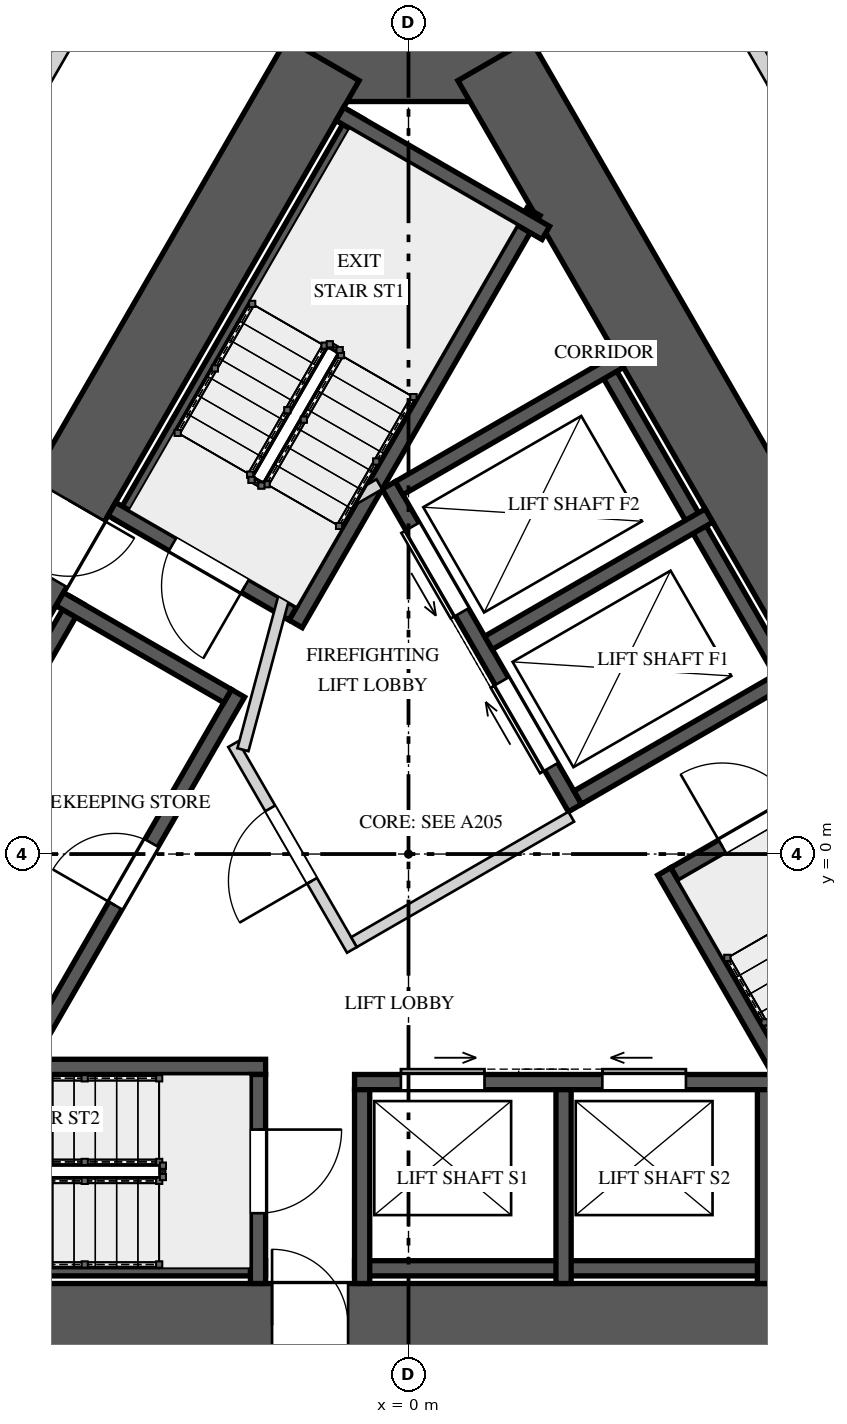
"""IFC4 building model, lengths in metres.
Left out: names, types, materials, properties, quantities, classifications, styles, units other than length and angle.
Written with IfcOpenShell. Run it as: python <this file> out.ifc"""

import sys

from ifc_helpers import new_model, si_unit, direction, frame, frame_2d, origin, place, context, subcontext, project, spatial, rectangle, extrude, element, fill, save


model = new_model("IFC4")
c1 = context("Model", 3, precision=1e-05, world=origin(), true_north=direction((0.0, 1.0)))
c2 = subcontext(c1, "Body", "Model", "MODEL_VIEW")
j1 = project(units=[si_unit("LENGTHUNIT", "METRE"), si_unit("PLANEANGLEUNIT", "RADIAN")], contexts=[c1])
p1 = place(None, origin())
s1 = spatial("IfcSite", under=j1, at=p1, CompositionType="ELEMENT")
p2 = place(p1, origin())
s2 = spatial("IfcBuilding", under=s1, at=p2, CompositionType="ELEMENT")
p3 = place(p2, frame((0.0, 0.0, 20.0)))
s3 = spatial("IfcBuildingStorey", under=s2, at=p3, CompositionType="ELEMENT", Elevation=20.0)
p4 = place(p3, frame((1.443, 10.45, 0.0), z_axis=(0.0, 0.0, 1.0), x_axis=(-1.0, 0.0, 0.0)))
e1 = element("IfcWall", 1, at=p4, inside=s3, PredefinedType="SHEAR", context=c2, shape_type="SweptSolid", body=[
    extrude(rectangle(XDim=2.887, YDim=1.1, at=frame_2d((1.443, 0.0))), origin(), (0.0, 0.0, 1.0), 5.0),
])
p5 = place(p3, frame((-1.126, 10.45, 0.0), z_axis=(0.0, 0.0, 1.0), x_axis=(-0.500001757713, -0.866024388966, 0.0)))
e2 = element("IfcWall", 2, at=p5, inside=s3, PredefinedType="SHEAR", context=c2, shape_type="SweptSolid", body=[
    extrude(rectangle(XDim=16.974, YDim=1.1, at=frame_2d((8.487, 0.0))), origin(), (0.0, 0.0, 1.0), 5.0),
])
p6 = place(p5, frame((6.692, 0.0, 0.0)))
e3 = element("IfcOpeningElement", 3, at=p6, cuts=e2, PredefinedType="OPENING", context=c2, shape_type="SweptSolid", body=[
    extrude(rectangle(XDim=1.0, YDim=2.4, at=frame_2d((0.5, 1.2))), frame((0.0, 0.56, 0.0), z_axis=(0.0, -1.0, 0.0), x_axis=(1.0, 0.0, 0.0)), (0.0, 0.0, 1.0), 1.12),
])
p7 = place(p5, frame((14.397, 0.0, 0.0)))
e4 = element("IfcOpeningElement", 4, at=p7, cuts=e2, PredefinedType="OPENING", context=c2, shape_type="SweptSolid", body=[
    extrude(rectangle(XDim=0.8, YDim=2.1, at=frame_2d((0.4, 1.05))), frame((0.0, 0.56, 0.0), z_axis=(0.0, -1.0, 0.0), x_axis=(1.0, 0.0, 0.0)), (0.0, 0.0, 1.0), 1.12),
])
p8 = place(p3, frame((-8.487, -6.2, 0.0), z_axis=(0.0, 0.0, 1.0), x_axis=(1.0, 0.0, 0.0)))
e5 = element("IfcWall", 5, at=p8, inside=s3, PredefinedType="SHEAR", context=c2, shape_type="SweptSolid", body=[
    extrude(rectangle(XDim=16.974, YDim=1.1, at=frame_2d((8.487, 0.0))), origin(), (0.0, 0.0, 1.0), 5.0),
])
p9 = place(p8, frame((6.692, 0.0, 0.0)))
e6 = element("IfcOpeningElement", 6, at=p9, cuts=e5, PredefinedType="OPENING", context=c2, shape_type="SweptSolid", body=[
    extrude(rectangle(XDim=1.0, YDim=2.4, at=frame_2d((0.5, 1.2))), frame((0.0, 0.56, 0.0), z_axis=(0.0, -1.0, 0.0), x_axis=(1.0, 0.0, 0.0)), (0.0, 0.0, 1.0), 1.12),
])
p10 = place(p3, frame((9.613, -4.25, 0.0), z_axis=(0.0, 0.0, 1.0), x_axis=(-0.500001757713, 0.866024388966, 0.0)))
e7 = element("IfcWall", 7, at=p10, inside=s3, PredefinedType="SHEAR", context=c2, shape_type="SweptSolid", body=[
    extrude(rectangle(XDim=16.974, YDim=1.1, at=frame_2d((8.487, 0.0))), origin(), (0.0, 0.0, 1.0), 5.0),
])
p11 = place(p10, frame((6.762, 0.0, 0.0)))
e8 = element("IfcOpeningElement", 8, at=p11, cuts=e7, PredefinedType="OPENING", context=c2, shape_type="SweptSolid", body=[
    extrude(rectangle(XDim=1.0, YDim=2.4, at=frame_2d((0.5, 1.2))), frame((0.0, 0.56, 0.0), z_axis=(0.0, -1.0, 0.0), x_axis=(1.0, 0.0, 0.0)), (0.0, 0.0, 1.0), 1.12),
])
p12 = place(p3, frame((-0.68, 9.722, 0.0), z_axis=(0.0, 0.0, 1.0), x_axis=(-0.49998037582, -0.866036733513, 0.0)))
e9 = element("IfcWall", 9, at=p12, inside=s3, PredefinedType="SOLIDWALL", context=c2, shape_type="SweptSolid", body=[
    extrude(rectangle(XDim=6.2, YDim=0.2, at=frame_2d((3.1, 0.0))), origin(), (0.0, 0.0, 1.0), 4.65),
])
p13 = place(p3, frame((1.646, 8.45, 0.0), z_axis=(0.0, 0.0, 1.0), x_axis=(-0.500006002103, -0.866021938441, 0.0)))
e10 = element("IfcWall", 10, at=p13, inside=s3, PredefinedType="SOLIDWALL", context=c2, shape_type="SweptSolid", body=[
    extrude(rectangle(XDim=6.261, YDim=0.2, at=frame_2d((3.13, 0.0))), origin(), (0.0, 0.0, 1.0), 4.65),
])
p14 = place(p3, frame((1.806, 8.172, 0.0), z_axis=(0.0, 0.0, 1.0), x_axis=(-0.866054327916, 0.499949898588, 0.0)))
e11 = element("IfcWall", 11, at=p14, inside=s3, PredefinedType="SOLIDWALL", context=c2, shape_type="SweptSolid", body=[
    extrude(rectangle(XDim=3.128, YDim=0.2, at=frame_2d((1.564, 0.0))), origin(), (0.0, 0.0, 1.0), 4.65),
])
p15 = place(p3, frame((-1.521, 3.165, 0.0), z_axis=(0.0, 0.0, 1.0), x_axis=(-0.866027397988, 0.499996545922, 0.0)))
e12 = element("IfcWall", 12, at=p15, inside=s3, PredefinedType="SOLIDWALL", context=c2, shape_type="SweptSolid", body=[
    extrude(rectangle(XDim=2.75, YDim=0.2, at=frame_2d((1.375, 0.0))), origin(), (0.0, 0.0, 1.0), 4.65),
])
p16 = place(p15, frame((0.725, 0.0, 0.0)))
e13 = element("IfcOpeningElement", 13, at=p16, cuts=e12, PredefinedType="OPENING", context=c2, shape_type="SweptSolid", body=[
    extrude(rectangle(XDim=1.1, YDim=2.4, at=frame_2d((0.55, 1.2))), frame((0.0, 0.11, 0.0), z_axis=(0.0, -1.0, 0.0), x_axis=(1.0, 0.0, 0.0)), (0.0, 0.0, 1.0), 0.22),
])
p17 = place(p3, frame((-8.08, -5.45, 0.0), z_axis=(0.0, 0.0, 1.0), x_axis=(1.0, 0.0, 0.0)))
e14 = element("IfcWall", 14, at=p17, inside=s3, PredefinedType="SOLIDWALL", context=c2, shape_type="SweptSolid", body=[
    extrude(rectangle(XDim=6.2, YDim=0.2, at=frame_2d((3.1, 0.0))), origin(), (0.0, 0.0, 1.0), 4.65),
])
p18 = place(p3, frame((-8.141, -2.8, 0.0), z_axis=(0.0, 0.0, 1.0), x_axis=(1.0, 0.0, 0.0)))
e15 = element("IfcWall", 15, at=p18, inside=s3, PredefinedType="SOLIDWALL", context=c2, shape_type="SweptSolid", body=[
    extrude(rectangle(XDim=6.261, YDim=0.2, at=frame_2d((3.13, 0.0))), origin(), (0.0, 0.0, 1.0), 4.65),
])
p19 = place(p3, frame((-1.98, -2.9, 0.0), z_axis=(0.0, 0.0, 1.0), x_axis=(0.0, -1.0, 0.0)))
e16 = element("IfcWall", 16, at=p19, inside=s3, PredefinedType="SOLIDWALL", context=c2, shape_type="SweptSolid", body=[
    extrude(rectangle(XDim=2.75, YDim=0.2, at=frame_2d((1.375, 0.0))), origin(), (0.0, 0.0, 1.0), 4.65),
])
p20 = place(p19, frame((0.725, 0.0, 0.0)))
e17 = element("IfcOpeningElement", 17, at=p20, cuts=e16, PredefinedType="OPENING", context=c2, shape_type="SweptSolid", body=[
    extrude(rectangle(XDim=1.1, YDim=2.4, at=frame_2d((0.55, 1.2))), frame((0.0, 0.11, 0.0), z_axis=(0.0, -1.0, 0.0), x_axis=(1.0, 0.0, 0.0)), (0.0, 0.0, 1.0), 0.22),
])
p21 = place(p3, frame((6.495, -5.65, 0.0), z_axis=(0.0, 0.0, 1.0), x_axis=(-0.499976754523, 0.866038824151, 0.0)))
e18 = element("IfcWall", 18, at=p21, inside=s3, PredefinedType="SOLIDWALL", context=c2, shape_type="SweptSolid", body=[
    extrude(rectangle(XDim=6.26, YDim=0.2, at=frame_2d((3.13, 0.0))), origin(), (0.0, 0.0, 1.0), 4.65),
])
p22 = place(p3, frame((3.501, -0.265, 0.0), z_axis=(0.0, 0.0, 1.0), x_axis=(0.866027397988, 0.499996545922, 0.0)))
e19 = element("IfcWall", 19, at=p22, inside=s3, PredefinedType="SOLIDWALL", context=c2, shape_type="SweptSolid", body=[
    extrude(rectangle(XDim=2.75, YDim=0.2, at=frame_2d((1.375, 0.0))), origin(), (0.0, 0.0, 1.0), 4.65),
])
p23 = place(p22, frame((0.725, 0.0, 0.0)))
e20 = element("IfcOpeningElement", 20, at=p23, cuts=e19, PredefinedType="OPENING", context=c2, shape_type="SweptSolid", body=[
    extrude(rectangle(XDim=1.1, YDim=2.4, at=frame_2d((0.55, 1.2))), frame((0.0, 0.11, 0.0), z_axis=(0.0, -1.0, 0.0), x_axis=(1.0, 0.0, 0.0)), (0.0, 0.0, 1.0), 0.22),
])
p24 = place(p3, frame((-4.993, -2.648, 0.0), z_axis=(0.0, 0.0, 1.0), x_axis=(0.499996545922, 0.866027397988, 0.0)))
e21 = element("IfcWall", 21, at=p24, inside=s3, PredefinedType="SOLIDWALL", context=c2, shape_type="SweptSolid", body=[
    extrude(rectangle(XDim=5.5, YDim=0.2, at=frame_2d((2.75, 0.0))), origin(), (0.0, 0.0, 1.0), 4.65),
])
p25 = place(p24, frame((2.275, 0.0, 0.0)))
e22 = element("IfcOpeningElement", 22, at=p25, cuts=e21, PredefinedType="OPENING", context=c2, shape_type="SweptSolid", body=[
    extrude(rectangle(XDim=0.95, YDim=2.4, at=frame_2d((0.475, 1.2))), frame((0.0, 0.11, 0.0), z_axis=(0.0, -1.0, 0.0), x_axis=(1.0, 0.0, 0.0)), (0.0, 0.0, 1.0), 0.22),
])
p26 = place(p3, frame((-4.365, 3.34, 0.0), z_axis=(0.0, 0.0, 1.0), x_axis=(-0.499996545922, -0.866027397988, 0.0)))
e23 = element("IfcWall", 23, at=p26, inside=s3, PredefinedType="SOLIDWALL", context=c2, shape_type="SweptSolid", body=[
    extrude(rectangle(XDim=5.5, YDim=0.2, at=frame_2d((2.75, 0.0))), origin(), (0.0, 0.0, 1.0), 4.65),
])
p27 = place(p3, frame((-2.38, 2.078, 0.0), z_axis=(0.0, 0.0, 1.0), x_axis=(-0.866054858364, 0.499948979701, 0.0)))
e24 = element("IfcWall", 24, at=p27, inside=s3, PredefinedType="SOLIDWALL", context=c2, shape_type="SweptSolid", body=[
    extrude(rectangle(XDim=2.55, YDim=0.2, at=frame_2d((1.275, 0.0))), origin(), (0.0, 0.0, 1.0), 4.65),
])
p28 = place(p3, frame((-0.71, -3.0, 0.0), z_axis=(0.0, 0.0, 1.0), x_axis=(1.0, 0.0, 0.0)))
e25 = element("IfcWall", 25, at=p28, inside=s3, PredefinedType="SOLIDWALL", context=c2, shape_type="SweptSolid", body=[
    extrude(rectangle(XDim=5.5, YDim=0.2, at=frame_2d((2.75, 0.0))), origin(), (0.0, 0.0, 1.0), 4.65),
])
p29 = place(p28, frame((0.61, 0.0, 0.0)))
e26 = element("IfcOpeningElement", 26, at=p29, cuts=e25, PredefinedType="OPENING", context=c2, shape_type="SweptSolid", body=[
    extrude(rectangle(XDim=1.1, YDim=2.1, at=frame_2d((0.55, 1.05))), frame((0.0, 0.11, 0.0), z_axis=(0.0, -1.0, 0.0), x_axis=(1.0, 0.0, 0.0)), (0.0, 0.0, 1.0), 0.22),
])
p30 = place(p28, frame((3.26, 0.0, 0.0)))
e27 = element("IfcOpeningElement", 27, at=p30, cuts=e25, PredefinedType="OPENING", context=c2, shape_type="SweptSolid", body=[
    extrude(rectangle(XDim=1.1, YDim=2.1, at=frame_2d((0.55, 1.05))), frame((0.0, 0.11, 0.0), z_axis=(0.0, -1.0, 0.0), x_axis=(1.0, 0.0, 0.0)), (0.0, 0.0, 1.0), 0.22),
])
p31 = place(p3, frame((-0.71, -5.45, 0.0), z_axis=(0.0, 0.0, 1.0), x_axis=(1.0, 0.0, 0.0)))
e28 = element("IfcWall", 28, at=p31, inside=s3, PredefinedType="SOLIDWALL", context=c2, shape_type="SweptSolid", body=[
    extrude(rectangle(XDim=5.5, YDim=0.2, at=frame_2d((2.75, 0.0))), origin(), (0.0, 0.0, 1.0), 4.65),
])
for number, where, z_axis, x_axis in (
    (29, (-0.61, -3.1, 0.0), (0.0, 0.0, 1.0), (0.0, -1.0, 0.0)),
    (30, (2.04, -3.1, 0.0), (0.0, 0.0, 1.0), (0.0, -1.0, 0.0)),
    (31, (4.69, -3.1, 0.0), (0.0, 0.0, 1.0), (0.0, -1.0, 0.0)),
):
    element("IfcWall", number, at=place(p3, frame(where, z_axis=z_axis, x_axis=x_axis)), inside=s3, PredefinedType="SOLIDWALL", context=c2, shape_type="SweptSolid", body=[
        extrude(rectangle(XDim=2.55, YDim=0.2, at=frame_2d((1.275, 0.0))), origin(), (0.0, 0.0, 1.0), 4.65),
    ])
p32 = place(p3, frame((2.19, 0.606, 0.0), z_axis=(0.0, 0.0, 1.0), x_axis=(-0.500002801628, 0.866023786258, 0.0)))
e32 = element("IfcWall", 32, at=p32, inside=s3, PredefinedType="SOLIDWALL", context=c2, shape_type="SweptSolid", body=[
    extrude(rectangle(XDim=4.9, YDim=0.2, at=frame_2d((2.45, 0.0))), origin(), (0.0, 0.0, 1.0), 4.65),
])
p33 = place(p32, frame((0.625, 0.0, 0.0)))
e33 = element("IfcOpeningElement", 33, at=p33, cuts=e32, PredefinedType="OPENING", context=c2, shape_type="SweptSolid", body=[
    extrude(rectangle(XDim=1.3, YDim=2.1, at=frame_2d((0.65, 1.05))), frame((0.0, 0.11, 0.0), z_axis=(0.0, -1.0, 0.0), x_axis=(1.0, 0.0, 0.0)), (0.0, 0.0, 1.0), 0.22),
])
p34 = place(p32, frame((2.975, 0.0, 0.0)))
e34 = element("IfcOpeningElement", 34, at=p34, cuts=e32, PredefinedType="OPENING", context=c2, shape_type="SweptSolid", body=[
    extrude(rectangle(XDim=1.3, YDim=2.1, at=frame_2d((0.65, 1.05))), frame((0.0, 0.11, 0.0), z_axis=(0.0, -1.0, 0.0), x_axis=(1.0, 0.0, 0.0)), (0.0, 0.0, 1.0), 0.22),
])
p35 = place(p3, frame((5.005, 2.231, 0.0), z_axis=(0.0, 0.0, 1.0), x_axis=(-0.500002801628, 0.866023786258, 0.0)))
e35 = element("IfcWall", 35, at=p35, inside=s3, PredefinedType="SOLIDWALL", context=c2, shape_type="SweptSolid", body=[
    extrude(rectangle(XDim=4.9, YDim=0.2, at=frame_2d((2.45, 0.0))), origin(), (0.0, 0.0, 1.0), 4.65),
])
p36 = place(p3, frame((2.227, 0.743, 0.0), z_axis=(0.0, 0.0, 1.0), x_axis=(0.866014461049, 0.500018952895, 0.0)))
e36 = element("IfcWall", 36, at=p36, inside=s3, PredefinedType="SOLIDWALL", context=c2, shape_type="SweptSolid", body=[
    extrude(rectangle(XDim=3.35, YDim=0.2, at=frame_2d((1.675, 0.0))), origin(), (0.0, 0.0, 1.0), 4.65),
])
p37 = place(p3, frame((1.052, 2.778, 0.0), z_axis=(0.0, 0.0, 1.0), x_axis=(0.866032680314, 0.499987396469, 0.0)))
e37 = element("IfcWall", 37, at=p37, inside=s3, PredefinedType="SOLIDWALL", context=c2, shape_type="SweptSolid", body=[
    extrude(rectangle(XDim=3.35, YDim=0.2, at=frame_2d((1.675, 0.0))), origin(), (0.0, 0.0, 1.0), 4.65),
])
p38 = place(p3, frame((-0.123, 4.813, 0.0), z_axis=(0.0, 0.0, 1.0), x_axis=(0.866014461049, 0.500018952895, 0.0)))
e38 = element("IfcWall", 38, at=p38, inside=s3, PredefinedType="SOLIDWALL", context=c2, shape_type="SweptSolid", body=[
    extrude(rectangle(XDim=3.35, YDim=0.2, at=frame_2d((1.675, 0.0))), origin(), (0.0, 0.0, 1.0), 4.65),
])
p39 = place(p3, frame((-0.744, -1.261, 0.0), z_axis=(0.0, 0.0, 1.0), x_axis=(-0.500004234368, 0.866022959057, 0.0)))
e39 = element("IfcWall", 39, at=p39, inside=s3, PredefinedType="PARTITIONING", context=c2, shape_type="SweptSolid", body=[
    extrude(rectangle(XDim=3.125, YDim=0.15, at=frame_2d((1.562, 0.0))), origin(), (0.0, 0.0, 1.0), 4.65),
])
p40 = place(p39, frame((1.05, 0.0, 0.0)))
e40 = element("IfcOpeningElement", 40, at=p40, cuts=e39, PredefinedType="OPENING", context=c2, shape_type="SweptSolid", body=[
    extrude(rectangle(XDim=1.1, YDim=2.4, at=frame_2d((0.55, 1.2))), frame((0.0, 0.085, 0.0), z_axis=(0.0, -1.0, 0.0), x_axis=(1.0, 0.0, 0.0)), (0.0, 0.0, 1.0), 0.17),
])
p41 = place(p3, frame((-0.717, -1.159, 0.0), z_axis=(0.0, 0.0, 1.0), x_axis=(0.866008176907, 0.50002983664, 0.0)))
e41 = element("IfcWall", 41, at=p41, inside=s3, PredefinedType="PARTITIONING", context=c2, shape_type="SweptSolid", body=[
    extrude(rectangle(XDim=3.3, YDim=0.15, at=frame_2d((1.65, 0.0))), origin(), (0.0, 0.0, 1.0), 4.65),
])
p42 = place(p3, frame((-2.178, 1.372, 0.0), z_axis=(0.0, 0.0, 1.0), x_axis=(0.258808958833, 0.96592852884, 0.0)))
e42 = element("IfcWall", 42, at=p42, inside=s3, PredefinedType="PARTITIONING", context=c2, shape_type="SweptSolid", body=[
    extrude(rectangle(XDim=2.903, YDim=0.15, at=frame_2d((1.451, 0.0))), origin(), (0.0, 0.0, 1.0), 4.65),
])
p43 = place(p3, frame((-1.51, 4.215, 0.0), z_axis=(0.0, 0.0, 1.0), x_axis=(0.866085525409, 0.49989585183, 0.0)))
e43 = element("IfcWall", 43, at=p43, inside=s3, PredefinedType="PARTITIONING", context=c2, shape_type="SweptSolid", body=[
    extrude(rectangle(XDim=1.3, YDim=0.15, at=frame_2d((0.65, 0.0))), origin(), (0.0, 0.0, 1.0), 4.65),
])
p44 = place(p3, frame((3.404, 12.604, 0.0), z_axis=(0.0, 0.0, 1.0), x_axis=(0.500000186108, -0.866025296335, 0.0)))
e44 = element("IfcWall", 44, at=p44, inside=s3, PredefinedType="SOLIDWALL", context=c2, shape_type="SweptSolid", body=[
    extrude(rectangle(XDim=2.815, YDim=0.2, at=frame_2d((1.408, 0.0))), origin(), (0.0, 0.0, 1.0), 4.65),
])
p45 = place(p3, frame((4.812, 10.165, 0.0), z_axis=(0.0, 0.0, 1.0), x_axis=(0.500174821557, -0.865924446982, 0.0)))
e45 = element("IfcWall", 45, at=p45, inside=s3, PredefinedType="SOLIDWALL", context=c2, shape_type="SweptSolid", body=[
    extrude(rectangle(XDim=0.95, YDim=0.2, at=frame_2d((0.475, 0.0))), origin(), (0.0, 0.0, 1.0), 3.75),
])
p46 = place(p3, frame((-4.812, 10.165, 0.0), z_axis=(0.0, 0.0, 1.0), x_axis=(0.500000186108, 0.866025296335, 0.0)))
e46 = element("IfcWall", 46, at=p46, inside=s3, PredefinedType="SOLIDWALL", context=c2, shape_type="SweptSolid", body=[
    extrude(rectangle(XDim=2.815, YDim=0.2, at=frame_2d((1.408, 0.0))), origin(), (0.0, 0.0, 1.0), 4.65),
])
p47 = place(p16, origin())
e47 = element("IfcDoor", 47, at=p47, inside=s3, OperationType="SINGLE_SWING_RIGHT", PredefinedType="DOOR", context=c2, shape_type="SweptSolid", body=[
    extrude(rectangle(XDim=1.1, YDim=2.4, at=frame_2d((0.55, 1.2))), frame((0.0, 0.025, 0.0), z_axis=(0.0, -1.0, 0.0), x_axis=(1.0, 0.0, 0.0)), (0.0, 0.0, 1.0), 0.05),
])
fill(e13, e47)
p48 = place(p20, origin())
e48 = element("IfcDoor", 48, at=p48, inside=s3, OperationType="SINGLE_SWING_LEFT", PredefinedType="DOOR", context=c2, shape_type="SweptSolid", body=[
    extrude(rectangle(XDim=1.1, YDim=2.4, at=frame_2d((0.55, 1.2))), frame((0.0, 0.025, 0.0), z_axis=(0.0, -1.0, 0.0), x_axis=(1.0, 0.0, 0.0)), (0.0, 0.0, 1.0), 0.05),
])
fill(e17, e48)
p49 = place(p23, origin())
e49 = element("IfcDoor", 49, at=p49, inside=s3, OperationType="SINGLE_SWING_RIGHT", PredefinedType="DOOR", context=c2, shape_type="SweptSolid", body=[
    extrude(rectangle(XDim=1.1, YDim=2.4, at=frame_2d((0.55, 1.2))), frame((0.0, 0.025, 0.0), z_axis=(0.0, -1.0, 0.0), x_axis=(1.0, 0.0, 0.0)), (0.0, 0.0, 1.0), 0.05),
])
fill(e20, e49)
p50 = place(p25, origin())
e50 = element("IfcDoor", 50, at=p50, inside=s3, OperationType="SINGLE_SWING_LEFT", PredefinedType="DOOR", context=c2, shape_type="SweptSolid", body=[
    extrude(rectangle(XDim=0.95, YDim=2.4, at=frame_2d((0.475, 1.2))), frame((0.0, 0.025, 0.0), z_axis=(0.0, -1.0, 0.0), x_axis=(1.0, 0.0, 0.0)), (0.0, 0.0, 1.0), 0.05),
])
fill(e22, e50)
p51 = place(p29, origin())
e51 = element("IfcDoor", 51, at=p51, inside=s3, OperationType="SLIDING_TO_RIGHT", PredefinedType="DOOR", context=c2, shape_type="SweptSolid", body=[
    extrude(rectangle(XDim=1.1, YDim=2.1, at=frame_2d((0.55, 1.05))), frame((0.0, 0.025, 0.0), z_axis=(0.0, -1.0, 0.0), x_axis=(1.0, 0.0, 0.0)), (0.0, 0.0, 1.0), 0.05),
])
fill(e26, e51)
p52 = place(p30, origin())
e52 = element("IfcDoor", 52, at=p52, inside=s3, OperationType="SLIDING_TO_LEFT", PredefinedType="DOOR", context=c2, shape_type="SweptSolid", body=[
    extrude(rectangle(XDim=1.1, YDim=2.1, at=frame_2d((0.55, 1.05))), frame((0.0, 0.025, 0.0), z_axis=(0.0, -1.0, 0.0), x_axis=(1.0, 0.0, 0.0)), (0.0, 0.0, 1.0), 0.05),
])
fill(e27, e52)
p53 = place(p33, origin())
e53 = element("IfcDoor", 53, at=p53, inside=s3, OperationType="SLIDING_TO_RIGHT", PredefinedType="DOOR", context=c2, shape_type="SweptSolid", body=[
    extrude(rectangle(XDim=1.3, YDim=2.1, at=frame_2d((0.65, 1.05))), frame((0.0, 0.025, 0.0), z_axis=(0.0, -1.0, 0.0), x_axis=(1.0, 0.0, 0.0)), (0.0, 0.0, 1.0), 0.05),
])
fill(e33, e53)
p54 = place(p34, origin())
e54 = element("IfcDoor", 54, at=p54, inside=s3, OperationType="SLIDING_TO_LEFT", PredefinedType="DOOR", context=c2, shape_type="SweptSolid", body=[
    extrude(rectangle(XDim=1.3, YDim=2.1, at=frame_2d((0.65, 1.05))), frame((0.0, 0.025, 0.0), z_axis=(0.0, -1.0, 0.0), x_axis=(1.0, 0.0, 0.0)), (0.0, 0.0, 1.0), 0.05),
])
fill(e34, e54)
p55 = place(p40, origin())
e55 = element("IfcDoor", 55, at=p55, inside=s3, OperationType="SINGLE_SWING_RIGHT", PredefinedType="DOOR", context=c2, shape_type="SweptSolid", body=[
    extrude(rectangle(XDim=1.1, YDim=2.4, at=frame_2d((0.55, 1.2))), frame((0.0, 0.025, 0.0), z_axis=(0.0, -1.0, 0.0), x_axis=(1.0, 0.0, 0.0)), (0.0, 0.0, 1.0), 0.05),
])
fill(e40, e55)
p56 = place(p6, origin())
e56 = element("IfcDoor", 56, at=p56, inside=s3, OperationType="SINGLE_SWING_LEFT", PredefinedType="DOOR", context=c2, shape_type="SweptSolid", body=[
    extrude(rectangle(XDim=1.0, YDim=2.4, at=frame_2d((0.5, 1.2))), frame((0.0, 0.025, 0.0), z_axis=(0.0, -1.0, 0.0), x_axis=(1.0, 0.0, 0.0)), (0.0, 0.0, 1.0), 0.05),
])
fill(e3, e56)
p57 = place(p9, origin())
e57 = element("IfcDoor", 57, at=p57, inside=s3, OperationType="SINGLE_SWING_RIGHT", PredefinedType="DOOR", context=c2, shape_type="SweptSolid", body=[
    extrude(rectangle(XDim=1.0, YDim=2.4, at=frame_2d((0.5, 1.2))), frame((0.0, 0.025, 0.0), z_axis=(0.0, -1.0, 0.0), x_axis=(1.0, 0.0, 0.0)), (0.0, 0.0, 1.0), 0.05),
])
fill(e6, e57)
save(model, sys.argv[1])
